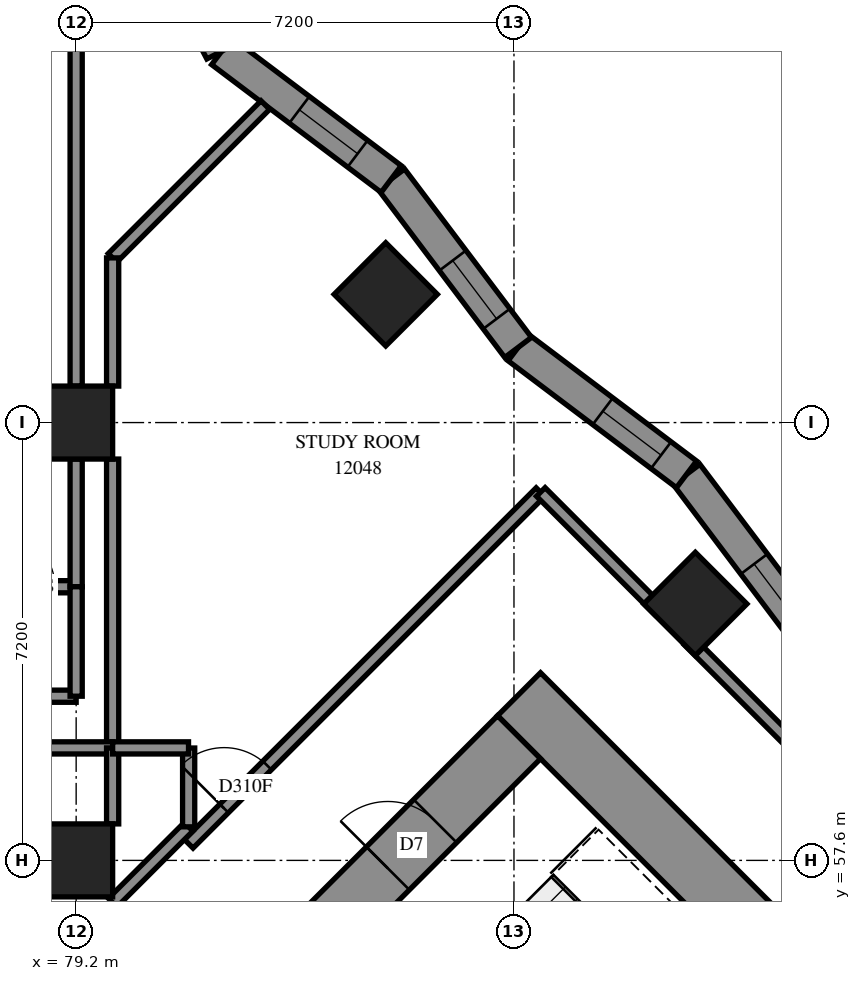
"""IFC4 building model, lengths in metres.
Left out: names, types, materials, properties, quantities, classifications, styles, units other than length and angle.
Written with IfcOpenShell. Run it as: python <this file> out.ifc"""

import sys

from ifc_helpers import new_model, si_unit, direction, frame, frame_2d, origin, origin_2d, place, context, subcontext, project, spatial, polyline, rectangle, outline, extrude, element, fill, save


model = new_model("IFC4")
c1 = context("Model", 3, precision=1e-05, world=origin(), true_north=direction((0.0, 1.0)))
c2 = subcontext(c1, "Body", "Model", "MODEL_VIEW")
j1 = project(units=[si_unit("LENGTHUNIT", "METRE"), si_unit("PLANEANGLEUNIT", "RADIAN")], contexts=[c1])
p1 = place(None, origin())
s1 = spatial("IfcSite", under=j1, at=p1, CompositionType="ELEMENT")
p2 = place(p1, origin())
s2 = spatial("IfcBuilding", under=s1, at=p2, CompositionType="ELEMENT")
p3 = place(p2, frame((0.0, 0.0, 47.4)))
s3 = spatial("IfcBuildingStorey", under=s2, at=p3, CompositionType="ELEMENT", Elevation=47.4)
for number, where, z_axis, x_axis in (
    (1, (79.2, 57.6, 0.0), (0.0, 0.0, 1.0), (1.0, 0.0, 0.0)),
    (2, (79.2, 64.8, 0.0), (0.0, 0.0, 1.0), (1.0, 0.0, 0.0)),
    (3, (84.291, 66.909, 0.0), (0.0, 0.0, 1.0), (0.707, -0.707, 0.0)),
    (4, (89.382, 61.818, 0.0), (0.0, 0.0, 1.0), (0.707, -0.707, 0.0)),
):
    element("IfcColumn", number, at=place(p3, frame(where, z_axis=z_axis, x_axis=x_axis)), inside=s3, PredefinedType="COLUMN", context=c2, shape_type="SweptSolid", body=[
        extrude(rectangle(XDim=1.2, YDim=1.2, at=origin_2d()), origin(), (0.0, 0.0, 1.0), 3.1),
    ])
p4 = place(p3, frame((86.483, 60.333, -0.3), z_axis=(0.0, 0.0, 1.0), x_axis=(0.70710983, -0.7071037324, 0.0)))
e5 = element("IfcWall", 5, at=p4, inside=s3, PredefinedType="SHEAR", context=c2, shape_type="SweptSolid", body=[
    extrude(rectangle(XDim=16.4, YDim=1.0, at=frame_2d((8.2, 0.0))), origin(), (0.0, 0.0, 1.0), 2.7),
])
p5 = place(p4, frame((11.0, 0.0, 0.3)))
e6 = element("IfcOpeningElement", 6, at=p5, cuts=e5, PredefinedType="OPENING", context=c2, shape_type="SweptSolid", body=[
    extrude(rectangle(XDim=0.8, YDim=2.1, at=frame_2d((0.4, 1.05))), frame((0.0, 0.51, 0.0), z_axis=(0.0, -1.0, 0.0), x_axis=(1.0, 0.0, 0.0)), (0.0, 0.0, 1.0), 1.02),
])
p6 = place(p3, frame((76.301, 49.443, -0.3), z_axis=(0.0, 0.0, 1.0), x_axis=(0.7071067812, 0.7071067812, 0.0)))
e7 = element("IfcWall", 7, at=p6, inside=s3, PredefinedType="SHEAR", context=c2, shape_type="SweptSolid", body=[
    extrude(rectangle(XDim=14.4, YDim=1.0, at=frame_2d((7.2, 0.0))), origin(), (0.0, 0.0, 1.0), 2.7),
])
p7 = place(p6, frame((4.55, 0.0, 0.3)))
e8 = element("IfcOpeningElement", 8, at=p7, cuts=e7, PredefinedType="OPENING", context=c2, shape_type="SweptSolid", body=[
    extrude(rectangle(XDim=1.1, YDim=2.1, at=frame_2d((0.55, 1.05))), frame((0.0, 0.51, 0.0), z_axis=(0.0, -1.0, 0.0), x_axis=(1.0, 0.0, 0.0)), (0.0, 0.0, 1.0), 1.02),
])
p8 = place(p6, frame((11.35, 0.0, 0.3)))
e9 = element("IfcOpeningElement", 9, at=p8, cuts=e7, PredefinedType="OPENING", context=c2, shape_type="SweptSolid", body=[
    extrude(rectangle(XDim=1.1, YDim=2.1, at=frame_2d((0.55, 1.05))), frame((0.0, 0.51, 0.0), z_axis=(0.0, -1.0, 0.0), x_axis=(1.0, 0.0, 0.0)), (0.0, 0.0, 1.0), 1.02),
])
p9 = place(p3, frame((91.325, 61.179, 0.0), z_axis=(0.0, 0.0, 1.0), x_axis=(-0.6019499233, 0.7985338376, 0.0)))
e10 = element("IfcWall", 10, at=p9, inside=s3, PredefinedType="SOLIDWALL", context=c2, shape_type="SweptSolid", body=[
    extrude(outline(polyline([(0.039, -0.275), (3.506, -0.275), (3.429, 0.275), (-0.039, 0.275), (0.039, -0.275)])), origin(), (0.0, 0.0, 1.0), 3.1),
])
p10 = place(p9, frame((0.421, 0.0, 0.5)))
e11 = element("IfcOpeningElement", 11, at=p10, cuts=e10, PredefinedType="OPENING", context=c2, shape_type="SweptSolid", body=[
    extrude(rectangle(XDim=1.2, YDim=2.45, at=frame_2d((0.6, 1.225))), frame((0.0, 0.285, 0.0), z_axis=(0.0, -1.0, 0.0), x_axis=(1.0, 0.0, 0.0)), (0.0, 0.0, 1.0), 0.57),
])
p11 = place(p3, frame((89.238, 63.948, 0.0), z_axis=(0.0, 0.0, 1.0), x_axis=(-0.7985338376, 0.6019499233, 0.0)))
e12 = element("IfcWall", 12, at=p11, inside=s3, PredefinedType="SOLIDWALL", context=c2, shape_type="SweptSolid", body=[
    extrude(outline(polyline([(-0.039, -0.275), (3.429, -0.275), (3.506, 0.275), (0.039, 0.275), (-0.039, -0.275)])), origin(), (0.0, 0.0, 1.0), 3.1),
])
p12 = place(p11, frame((0.525, 0.0, 0.5)))
e13 = element("IfcOpeningElement", 13, at=p12, cuts=e12, PredefinedType="OPENING", context=c2, shape_type="SweptSolid", body=[
    extrude(rectangle(XDim=1.2, YDim=2.45, at=frame_2d((0.6, 1.225))), frame((0.0, 0.285, 0.0), z_axis=(0.0, -1.0, 0.0), x_axis=(1.0, 0.0, 0.0)), (0.0, 0.0, 1.0), 0.57),
])
p13 = place(p3, frame((86.469, 66.036, 0.0), z_axis=(0.0, 0.0, 1.0), x_axis=(-0.6019499233, 0.7985338376, 0.0)))
e14 = element("IfcWall", 14, at=p13, inside=s3, PredefinedType="SOLIDWALL", context=c2, shape_type="SweptSolid", body=[
    extrude(outline(polyline([(0.039, -0.275), (3.506, -0.275), (3.429, 0.275), (-0.039, 0.275), (0.039, -0.275)])), origin(), (0.0, 0.0, 1.0), 3.1),
])
p14 = place(p13, frame((0.589, 0.0, 0.5)))
e15 = element("IfcOpeningElement", 15, at=p14, cuts=e14, PredefinedType="OPENING", context=c2, shape_type="SweptSolid", body=[
    extrude(rectangle(XDim=1.2, YDim=2.45, at=frame_2d((0.6, 1.225))), frame((0.0, 0.285, 0.0), z_axis=(0.0, -1.0, 0.0), x_axis=(1.0, 0.0, 0.0)), (0.0, 0.0, 1.0), 0.57),
])
p15 = place(p3, frame((84.381, 68.805, 0.0), z_axis=(0.0, 0.0, 1.0), x_axis=(-0.7985299545, 0.6019550746, 0.0)))
e16 = element("IfcWall", 16, at=p15, inside=s3, PredefinedType="SOLIDWALL", context=c2, shape_type="SweptSolid", body=[
    extrude(outline(polyline([(-0.039, -0.275), (3.429, -0.275), (3.554, 0.275), (0.039, 0.275), (-0.039, -0.275)])), origin(), (0.0, 0.0, 1.0), 3.1),
])
p16 = place(p15, frame((0.692, 0.0, 0.5)))
e17 = element("IfcOpeningElement", 17, at=p16, cuts=e16, PredefinedType="OPENING", context=c2, shape_type="SweptSolid", body=[
    extrude(rectangle(XDim=1.2, YDim=2.45, at=frame_2d((0.6, 1.225))), frame((0.0, 0.285, 0.0), z_axis=(0.0, -1.0, 0.0), x_axis=(1.0, 0.0, 0.0)), (0.0, 0.0, 1.0), 0.57),
])
p17 = place(p3, frame((81.593, 70.906, 0.0), z_axis=(0.0, 0.0, 1.0), x_axis=(-0.4619496701, 0.8869061407, 0.0)))
e18 = element("IfcWall", 18, at=p17, inside=s3, PredefinedType="SOLIDWALL", context=c2, shape_type="SweptSolid", body=[
    extrude(outline(polyline([(0.062, -0.275), (3.663, -0.275), (3.214, 0.275), (-0.062, 0.275), (0.062, -0.275)])), origin(), (0.0, 0.0, 1.0), 3.1),
])
p18 = place(p17, frame((0.792, 0.0, 0.5)))
e19 = element("IfcOpeningElement", 19, at=p18, cuts=e18, PredefinedType="OPENING", context=c2, shape_type="SweptSolid", body=[
    extrude(rectangle(XDim=1.2, YDim=2.45, at=frame_2d((0.6, 1.225))), frame((0.0, 0.285, 0.0), z_axis=(0.0, -1.0, 0.0), x_axis=(1.0, 0.0, 0.0)), (0.0, 0.0, 1.0), 0.57),
])
p19 = place(p3, frame((81.052, 57.873, 0.0), z_axis=(0.0, 0.0, 1.0), x_axis=(0.7071067812, 0.7071067812, 0.0)))
e20 = element("IfcWall", 20, at=p19, inside=s3, PredefinedType="PARTITIONING", context=c2, shape_type="SweptSolid", body=[
    extrude(rectangle(XDim=8.18, YDim=0.2, at=frame_2d((4.09, 0.0))), origin(), (0.0, 0.0, 1.0), 3.1),
])
p20 = place(p19, frame((0.823, 0.0, 0.0)))
e21 = element("IfcOpeningElement", 21, at=p20, cuts=e20, PredefinedType="OPENING", context=c2, shape_type="SweptSolid", body=[
    extrude(rectangle(XDim=1.0, YDim=2.1, at=frame_2d((0.5, 1.05))), frame((0.0, 0.11, 0.0), z_axis=(0.0, -1.0, 0.0), x_axis=(1.0, 0.0, 0.0)), (0.0, 0.0, 1.0), 0.22),
])
p21 = place(p3, frame((89.271, 61.215, 0.0), z_axis=(0.0, 0.0, 1.0), x_axis=(0.7071067812, -0.7071067812, 0.0)))
e22 = element("IfcWall", 22, at=p21, inside=s3, PredefinedType="PARTITIONING", context=c2, shape_type="SweptSolid", body=[
    extrude(rectangle(XDim=6.505, YDim=0.2, at=frame_2d((3.253, 0.0))), origin(), (0.0, 0.0, 1.0), 3.1),
])
p22 = place(p3, frame((79.2, 65.4, 0.0), z_axis=(0.0, 0.0, 1.0), x_axis=(0.0, 1.0, 0.0)))
e23 = element("IfcWall", 23, at=p22, inside=s3, PredefinedType="PARTITIONING", context=c2, shape_type="SweptSolid", body=[
    extrude(rectangle(XDim=6.0, YDim=0.2, at=frame_2d((3.0, 0.0))), origin(), (0.0, 0.0, 1.0), 3.1),
])
p23 = place(p3, frame((79.8, 59.45, 0.0), z_axis=(0.0, 0.0, 1.0), x_axis=(0.0, 1.0, 0.0)))
e24 = element("IfcWall", 24, at=p23, inside=s3, PredefinedType="PARTITIONING", context=c2, shape_type="SweptSolid", body=[
    extrude(rectangle(XDim=4.75, YDim=0.2, at=frame_2d((2.375, 0.0))), origin(), (0.0, 0.0, 1.0), 3.1),
])
p24 = place(p3, frame((75.102, 62.1, 0.0), z_axis=(0.0, 0.0, 1.0), x_axis=(1.0, 0.0, 0.0)))
e25 = element("IfcWall", 25, at=p24, inside=s3, PredefinedType="PARTITIONING", context=c2, shape_type="SweptSolid", body=[
    extrude(rectangle(XDim=4.098, YDim=0.2, at=frame_2d((2.049, 0.0))), origin(), (0.0, 0.0, 1.0), 3.1),
])
p25 = place(p24, frame((2.848, 0.0, 0.0)))
e26 = element("IfcOpeningElement", 26, at=p25, cuts=e25, PredefinedType="OPENING", context=c2, shape_type="SweptSolid", body=[
    extrude(rectangle(XDim=0.9, YDim=2.1, at=frame_2d((0.45, 1.05))), frame((0.0, 0.11, 0.0), z_axis=(0.0, -1.0, 0.0), x_axis=(1.0, 0.0, 0.0)), (0.0, 0.0, 1.0), 0.22),
])
p26 = place(p3, frame((79.799, 67.509, 0.0), z_axis=(0.0, 0.0, 1.0), x_axis=(0.7070927062, 0.7071208559, 0.0)))
e27 = element("IfcWall", 27, at=p26, inside=s3, PredefinedType="PARTITIONING", context=c2, shape_type="SweptSolid", body=[
    extrude(rectangle(XDim=3.552, YDim=0.2, at=frame_2d((1.776, 0.0))), origin(), (0.0, 0.0, 1.0), 3.1),
])
p27 = place(p3, frame((86.841, 63.659, 0.0), z_axis=(0.0, 0.0, 1.0), x_axis=(0.7067795096, -0.7074339014, 0.0)))
e28 = element("IfcWall", 28, at=p27, inside=s3, PredefinedType="PARTITIONING", context=c2, shape_type="SweptSolid", body=[
    extrude(rectangle(XDim=2.751, YDim=0.2, at=frame_2d((1.375, 0.0))), origin(), (0.0, 0.0, 1.0), 3.1),
])
p28 = place(p3, frame((76.902, 60.3, 0.0), z_axis=(0.0, 0.0, 1.0), x_axis=(1.0, 0.0, 0.0)))
e29 = element("IfcWall", 29, at=p28, inside=s3, PredefinedType="PARTITIONING", context=c2, shape_type="SweptSolid", body=[
    extrude(rectangle(XDim=2.298, YDim=0.2, at=frame_2d((1.149, 0.0))), origin(), (0.0, 0.0, 1.0), 3.1),
])
p29 = place(p3, frame((79.8, 65.4, 0.0), z_axis=(0.0, 0.0, 1.0), x_axis=(0.0, 1.0, 0.0)))
e30 = element("IfcWall", 30, at=p29, inside=s3, PredefinedType="PARTITIONING", context=c2, shape_type="SweptSolid", body=[
    extrude(rectangle(XDim=2.108, YDim=0.2, at=frame_2d((1.054, 0.0))), origin(), (0.0, 0.0, 1.0), 3.1),
])
p30 = place(p3, frame((79.2, 62.1, 0.0), z_axis=(0.0, 0.0, 1.0), x_axis=(0.0, 1.0, 0.0)))
e31 = element("IfcWall", 31, at=p30, inside=s3, PredefinedType="PARTITIONING", context=c2, shape_type="SweptSolid", body=[
    extrude(rectangle(XDim=2.1, YDim=0.2, at=frame_2d((1.05, 0.0))), origin(), (0.0, 0.0, 1.0), 3.1),
])
p31 = place(p3, frame((77.75, 59.45, 0.0), z_axis=(0.0, 0.0, 1.0), x_axis=(1.0, 0.0, 0.0)))
e32 = element("IfcWall", 32, at=p31, inside=s3, PredefinedType="PARTITIONING", context=c2, shape_type="SweptSolid", body=[
    extrude(rectangle(XDim=2.05, YDim=0.2, at=frame_2d((1.025, 0.0))), origin(), (0.0, 0.0, 1.0), 3.1),
])
p32 = place(p3, frame((79.2, 60.3, 0.0), z_axis=(0.0, 0.0, 1.0), x_axis=(0.0, 1.0, 0.0)))
e33 = element("IfcWall", 33, at=p32, inside=s3, PredefinedType="PARTITIONING", context=c2, shape_type="SweptSolid", body=[
    extrude(rectangle(XDim=1.8, YDim=0.2, at=frame_2d((0.9, 0.0))), origin(), (0.0, 0.0, 1.0), 3.1),
])
p33 = place(p3, frame((79.801, 56.905, 0.0), z_axis=(0.0, 0.0, 1.0), x_axis=(0.7071067812, 0.7071067812, 0.0)))
e34 = element("IfcWall", 34, at=p33, inside=s3, PredefinedType="PARTITIONING", context=c2, shape_type="SweptSolid", body=[
    extrude(rectangle(XDim=1.765, YDim=0.2, at=frame_2d((0.882, 0.0))), origin(), (0.0, 0.0, 1.0), 3.1),
])
p34 = place(p3, frame((81.05, 58.152, 0.0), z_axis=(0.0, 0.0, 1.0), x_axis=(0.0, 1.0, 0.0)))
e35 = element("IfcWall", 35, at=p34, inside=s3, PredefinedType="PARTITIONING", context=c2, shape_type="SweptSolid", body=[
    extrude(rectangle(XDim=1.296, YDim=0.2, at=frame_2d((0.648, 0.0))), origin(), (0.0, 0.0, 1.0), 3.1),
])
p35 = place(p3, frame((79.8, 58.2, 0.0), z_axis=(0.0, 0.0, 1.0), x_axis=(0.0, 1.0, 0.0)))
e36 = element("IfcWall", 36, at=p35, inside=s3, PredefinedType="PARTITIONING", context=c2, shape_type="SweptSolid", body=[
    extrude(rectangle(XDim=1.25, YDim=0.2, at=frame_2d((0.625, 0.0))), origin(), (0.0, 0.0, 1.0), 3.1),
])
p36 = place(p3, frame((79.8, 59.45, 0.0), z_axis=(0.0, 0.0, 1.0), x_axis=(1.0, 0.0, 0.0)))
e37 = element("IfcWall", 37, at=p36, inside=s3, PredefinedType="PARTITIONING", context=c2, shape_type="SweptSolid", body=[
    extrude(rectangle(XDim=1.248, YDim=0.2, at=frame_2d((0.624, 0.0))), origin(), (0.0, 0.0, 1.0), 3.1),
])
p37 = place(p10, origin())
e38 = element("IfcWindow", 38, at=p37, inside=s3, PartitioningType="SINGLE_PANEL", PredefinedType="WINDOW", context=c2, shape_type="SweptSolid", body=[
    extrude(rectangle(XDim=1.2, YDim=2.45, at=frame_2d((0.6, 1.225))), frame((0.0, 0.155, 0.0), z_axis=(0.0, -1.0, 0.0), x_axis=(1.0, 0.0, 0.0)), (0.0, 0.0, 1.0), 0.06),
])
fill(e11, e38)
p38 = place(p12, origin())
e39 = element("IfcWindow", 39, at=p38, inside=s3, PartitioningType="SINGLE_PANEL", PredefinedType="WINDOW", context=c2, shape_type="SweptSolid", body=[
    extrude(rectangle(XDim=1.2, YDim=2.45, at=frame_2d((0.6, 1.225))), frame((0.0, 0.155, 0.0), z_axis=(0.0, -1.0, 0.0), x_axis=(1.0, 0.0, 0.0)), (0.0, 0.0, 1.0), 0.06),
])
fill(e13, e39)
p39 = place(p14, origin())
e40 = element("IfcWindow", 40, at=p39, inside=s3, PartitioningType="SINGLE_PANEL", PredefinedType="WINDOW", context=c2, shape_type="SweptSolid", body=[
    extrude(rectangle(XDim=1.2, YDim=2.45, at=frame_2d((0.6, 1.225))), frame((0.0, 0.155, 0.0), z_axis=(0.0, -1.0, 0.0), x_axis=(1.0, 0.0, 0.0)), (0.0, 0.0, 1.0), 0.06),
])
fill(e15, e40)
p40 = place(p16, origin())
e41 = element("IfcWindow", 41, at=p40, inside=s3, PartitioningType="SINGLE_PANEL", PredefinedType="WINDOW", context=c2, shape_type="SweptSolid", body=[
    extrude(rectangle(XDim=1.2, YDim=2.45, at=frame_2d((0.6, 1.225))), frame((0.0, 0.155, 0.0), z_axis=(0.0, -1.0, 0.0), x_axis=(1.0, 0.0, 0.0)), (0.0, 0.0, 1.0), 0.06),
])
fill(e17, e41)
p41 = place(p8, origin())
e42 = element("IfcDoor", 42, at=p41, inside=s3, OperationType="SINGLE_SWING_LEFT", PredefinedType="DOOR", context=c2, shape_type="SweptSolid", body=[
    extrude(rectangle(XDim=1.1, YDim=2.1, at=frame_2d((0.55, 1.05))), frame((0.0, 0.025, 0.0), z_axis=(0.0, -1.0, 0.0), x_axis=(1.0, 0.0, 0.0)), (0.0, 0.0, 1.0), 0.05),
])
fill(e9, e42)
p42 = place(p25, origin())
e43 = element("IfcDoor", 43, at=p42, inside=s3, OperationType="SINGLE_SWING_LEFT", PredefinedType="DOOR", context=c2, shape_type="SweptSolid", body=[
    extrude(rectangle(XDim=0.9, YDim=2.1, at=frame_2d((0.45, 1.05))), frame((0.0, 0.025, 0.0), z_axis=(0.0, -1.0, 0.0), x_axis=(1.0, 0.0, 0.0)), (0.0, 0.0, 1.0), 0.05),
])
fill(e26, e43)
p43 = place(p20, origin())
e44 = element("IfcDoor", 44, at=p43, inside=s3, OperationType="SINGLE_SWING_RIGHT", PredefinedType="DOOR", context=c2, shape_type="SweptSolid", body=[
    extrude(rectangle(XDim=1.0, YDim=2.1, at=frame_2d((0.5, 1.05))), frame((0.0, 0.025, 0.0), z_axis=(0.0, -1.0, 0.0), x_axis=(1.0, 0.0, 0.0)), (0.0, 0.0, 1.0), 0.05),
])
fill(e21, e44)
save(model, sys.argv[1])
